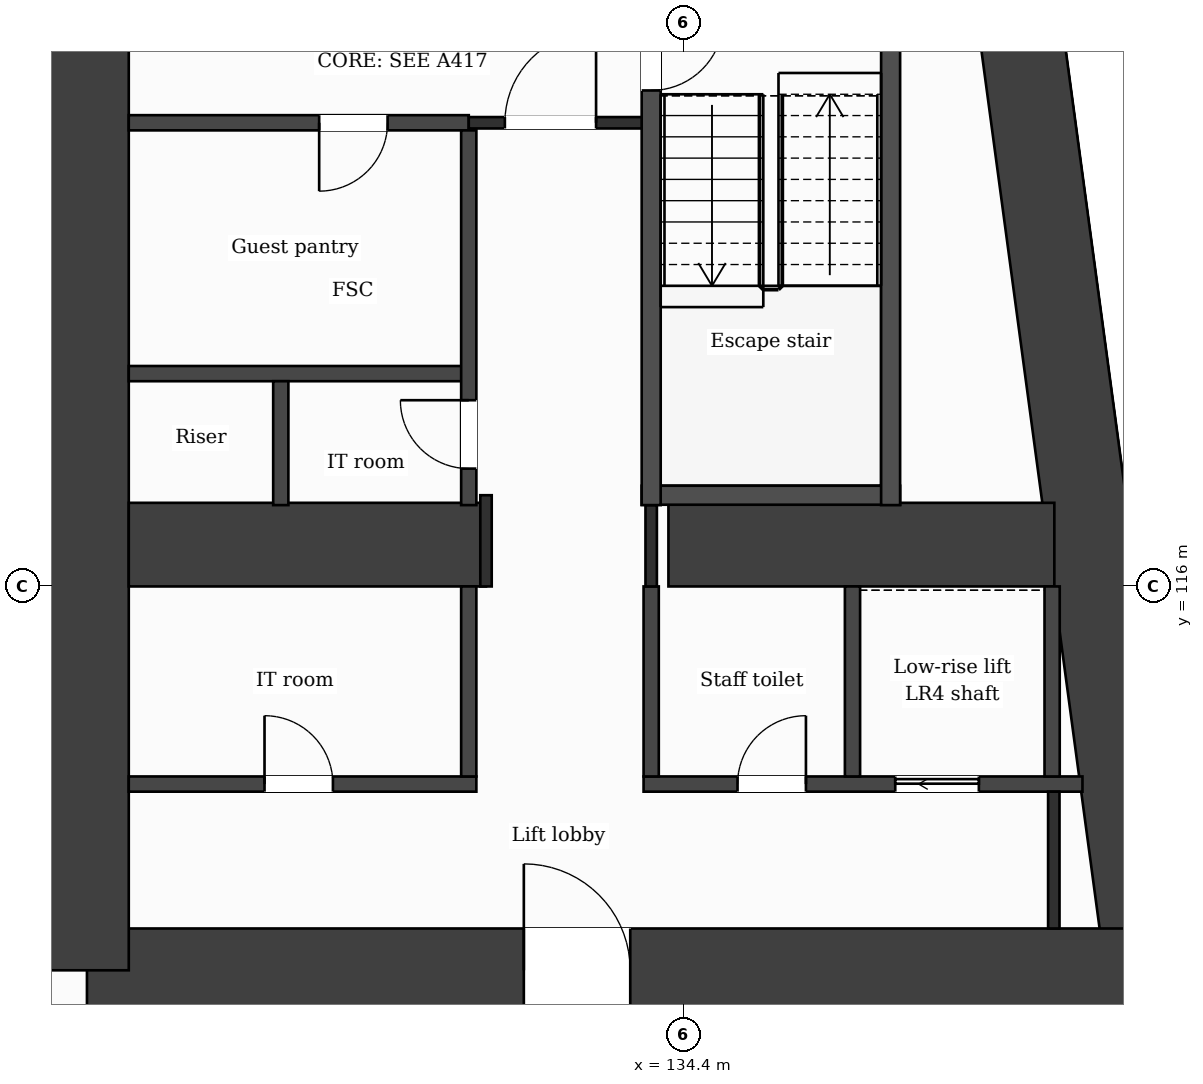
"""IFC4 building model, lengths in metres.
Left out: names, types, materials, properties, quantities, classifications, styles, units other than length and angle.
Written with IfcOpenShell. Run it as: python <this file> out.ifc"""

import sys

from ifc_helpers import new_model, si_unit, direction, frame, frame_2d, origin, place, context, subcontext, project, spatial, rectangle, extrude, element, fill, save


model = new_model("IFC4")
c1 = context("Model", 3, precision=1e-05, world=origin(), true_north=direction((0.0, 1.0)))
c2 = subcontext(c1, "Body", "Model", "MODEL_VIEW")
j1 = project(units=[si_unit("LENGTHUNIT", "METRE"), si_unit("PLANEANGLEUNIT", "RADIAN")], contexts=[c1])
p1 = place(None, origin())
s1 = spatial("IfcSite", under=j1, at=p1, CompositionType="ELEMENT")
p2 = place(p1, origin())
s2 = spatial("IfcBuilding", under=s1, at=p2, CompositionType="ELEMENT")
p3 = place(p2, frame((0.0, 0.0, 74.0)))
s3 = spatial("IfcBuildingStorey", under=s2, at=p3, CompositionType="ELEMENT", Elevation=74.0)
p4 = place(p3, frame((137.688, 131.85, 0.0), z_axis=(0.0, 0.0, 1.0), x_axis=(0.133411793472, -0.991060691059, 0.0)))
e1 = element("IfcWall", 1, at=p4, inside=s3, PredefinedType="SHEAR", context=c2, shape_type="SweptSolid", body=[
    extrude(rectangle(XDim=21.089, YDim=1.1, at=frame_2d((10.544, 0.0))), origin(), (0.0, 0.0, 1.0), 3.5),
])
p5 = place(p3, frame((140.502, 110.95, 0.0), z_axis=(0.0, 0.0, 1.0), x_axis=(-1.0, 0.0, 0.0)))
e2 = element("IfcWall", 2, at=p5, inside=s3, PredefinedType="SHEAR", context=c2, shape_type="SweptSolid", body=[
    extrude(rectangle(XDim=13.952, YDim=1.1, at=frame_2d((6.976, 0.0))), origin(), (0.0, 0.0, 1.0), 3.5),
])
p6 = place(p5, frame((6.804, 0.0, 0.0)))
e3 = element("IfcOpeningElement", 3, at=p6, cuts=e2, PredefinedType="OPENING", context=c2, shape_type="SweptSolid", body=[
    extrude(rectangle(XDim=1.4, YDim=2.1, at=frame_2d((0.7, 1.05))), frame((0.0, 0.56, 0.0), z_axis=(0.0, -1.0, 0.0), x_axis=(1.0, 0.0, 0.0)), (0.0, 0.0, 1.0), 1.12),
])
p7 = place(p3, frame((126.55, 110.95, 0.0), z_axis=(0.0, 0.0, 1.0), x_axis=(0.0, 1.0, 0.0)))
e4 = element("IfcWall", 4, at=p7, inside=s3, PredefinedType="SHEAR", context=c2, shape_type="SweptSolid", body=[
    extrude(rectangle(XDim=20.9, YDim=1.1, at=frame_2d((10.45, 0.0))), origin(), (0.0, 0.0, 1.0), 3.5),
])
p8 = place(p3, frame((127.1, 116.55, 0.0), z_axis=(0.0, 0.0, 1.0), x_axis=(1.0, 0.0, 0.0)))
e5 = element("IfcWall", 5, at=p8, inside=s3, PredefinedType="SHEAR", context=c2, shape_type="SweptSolid", body=[
    extrude(rectangle(XDim=4.7, YDim=1.1, at=frame_2d((2.35, 0.0))), origin(), (0.0, 0.0, 1.0), 3.5),
])
p9 = place(p3, frame((134.2, 116.55, 0.0), z_axis=(0.0, 0.0, 1.0), x_axis=(1.0, 0.0, 0.0)))
e6 = element("IfcWall", 6, at=p9, inside=s3, PredefinedType="SHEAR", context=c2, shape_type="SweptSolid", body=[
    extrude(rectangle(XDim=5.077, YDim=1.1, at=frame_2d((2.539, 0.0))), origin(), (0.0, 0.0, 1.0), 3.5),
])
p10 = place(p3, frame((127.1, 113.4, 0.0), z_axis=(0.0, 0.0, 1.0), x_axis=(1.0, 0.0, 0.0)))
e7 = element("IfcWall", 7, at=p10, inside=s3, PredefinedType="PARTITIONING", context=c2, shape_type="SweptSolid", body=[
    extrude(rectangle(XDim=4.573, YDim=0.2, at=frame_2d((2.287, 0.0))), origin(), (0.0, 0.0, 1.0), 3.18),
])
p11 = place(p10, frame((1.786, 0.0, 0.0)))
e8 = element("IfcOpeningElement", 8, at=p11, cuts=e7, PredefinedType="OPENING", context=c2, shape_type="SweptSolid", body=[
    extrude(rectangle(XDim=0.9, YDim=2.1, at=frame_2d((0.45, 1.05))), frame((0.0, 0.11, 0.0), z_axis=(0.0, -1.0, 0.0), x_axis=(1.0, 0.0, 0.0)), (0.0, 0.0, 1.0), 0.22),
])
p12 = place(p3, frame((133.873, 113.4, 0.0), z_axis=(0.0, 0.0, 1.0), x_axis=(1.0, 0.0, 0.0)))
e9 = element("IfcWall", 9, at=p12, inside=s3, PredefinedType="PARTITIONING", context=c2, shape_type="SweptSolid", body=[
    extrude(rectangle(XDim=5.774, YDim=0.2, at=frame_2d((2.887, 0.0))), origin(), (0.0, 0.0, 1.0), 3.18),
])
p13 = place(p12, frame((3.311, 0.0, 0.0)))
e10 = element("IfcOpeningElement", 10, at=p13, cuts=e9, PredefinedType="OPENING", context=c2, shape_type="SweptSolid", body=[
    extrude(rectangle(XDim=1.1, YDim=2.1, at=frame_2d((0.55, 1.05))), frame((0.0, 0.11, 0.0), z_axis=(0.0, -1.0, 0.0), x_axis=(1.0, 0.0, 0.0)), (0.0, 0.0, 1.0), 0.22),
])
p14 = place(p12, frame((1.236, 0.0, 0.0)))
e11 = element("IfcOpeningElement", 11, at=p14, cuts=e9, PredefinedType="OPENING", context=c2, shape_type="SweptSolid", body=[
    extrude(rectangle(XDim=0.9, YDim=2.1, at=frame_2d((0.45, 1.05))), frame((0.0, 0.11, 0.0), z_axis=(0.0, -1.0, 0.0), x_axis=(1.0, 0.0, 0.0)), (0.0, 0.0, 1.0), 0.22),
])
p15 = place(p3, frame((133.848, 117.2, 0.0), z_axis=(0.0, 0.0, 1.0), x_axis=(1.0, 0.0, 0.0)))
e12 = element("IfcWall", 12, at=p15, inside=s3, PredefinedType="PARTITIONING", context=c2, shape_type="SweptSolid", body=[
    extrude(rectangle(XDim=3.4, YDim=0.25, at=frame_2d((1.7, 0.0))), origin(), (0.0, 0.0, 1.0), 3.18),
])
p16 = place(p3, frame((127.1, 118.8, 0.0), z_axis=(0.0, 0.0, 1.0), x_axis=(1.0, 0.0, 0.0)))
e13 = element("IfcWall", 13, at=p16, inside=s3, PredefinedType="PARTITIONING", context=c2, shape_type="SweptSolid", body=[
    extrude(rectangle(XDim=4.473, YDim=0.2, at=frame_2d((2.236, 0.0))), origin(), (0.0, 0.0, 1.0), 3.18),
])
p17 = place(p3, frame((127.1, 122.1, 0.0), z_axis=(0.0, 0.0, 1.0), x_axis=(1.0, 0.0, 0.0)))
e14 = element("IfcWall", 14, at=p17, inside=s3, PredefinedType="PARTITIONING", context=c2, shape_type="SweptSolid", body=[
    extrude(rectangle(XDim=4.473, YDim=0.2, at=frame_2d((2.236, 0.0))), origin(), (0.0, 0.0, 1.0), 3.18),
])
p18 = place(p17, frame((2.505, 0.0, 0.0)))
e15 = element("IfcOpeningElement", 15, at=p18, cuts=e14, PredefinedType="OPENING", context=c2, shape_type="SweptSolid", body=[
    extrude(rectangle(XDim=0.9, YDim=2.1, at=frame_2d((0.45, 1.05))), frame((0.0, 0.11, 0.0), z_axis=(0.0, -1.0, 0.0), x_axis=(1.0, 0.0, 0.0)), (0.0, 0.0, 1.0), 0.22),
])
p19 = place(p3, frame((131.573, 122.1, 0.0), z_axis=(0.0, 0.0, 1.0), x_axis=(1.0, 0.0, 0.0)))
e16 = element("IfcWall", 16, at=p19, inside=s3, PredefinedType="PARTITIONING", context=c2, shape_type="SweptSolid", body=[
    extrude(rectangle(XDim=2.4, YDim=0.15, at=frame_2d((1.2, 0.0))), origin(), (0.0, 0.0, 1.0), 3.18),
])
p20 = place(p19, frame((0.475, 0.0, 0.0)))
e17 = element("IfcOpeningElement", 17, at=p20, cuts=e16, PredefinedType="OPENING", context=c2, shape_type="SweptSolid", body=[
    extrude(rectangle(XDim=1.2, YDim=2.1, at=frame_2d((0.6, 1.05))), frame((0.0, 0.085, 0.0), z_axis=(0.0, -1.0, 0.0), x_axis=(1.0, 0.0, 0.0)), (0.0, 0.0, 1.0), 0.17),
])
p21 = place(p3, frame((129.1, 117.07, 0.0), z_axis=(0.0, 0.0, 1.0), x_axis=(0.0, 1.0, 0.0)))
e18 = element("IfcWall", 18, at=p21, inside=s3, PredefinedType="PARTITIONING", context=c2, shape_type="SweptSolid", body=[
    extrude(rectangle(XDim=1.63, YDim=0.2, at=frame_2d((0.815, 0.0))), origin(), (0.0, 0.0, 1.0), 3.18),
])
p22 = place(p3, frame((131.573, 113.5, 0.0), z_axis=(0.0, 0.0, 1.0), x_axis=(0.0, 1.0, 0.0)))
e19 = element("IfcWall", 19, at=p22, inside=s3, PredefinedType="PARTITIONING", context=c2, shape_type="SweptSolid", body=[
    extrude(rectangle(XDim=2.5, YDim=0.2, at=frame_2d((1.25, 0.0))), origin(), (0.0, 0.0, 1.0), 3.18),
])
p23 = place(p3, frame((131.573, 117.07, 0.0), z_axis=(0.0, 0.0, 1.0), x_axis=(0.0, 1.0, 0.0)))
e20 = element("IfcWall", 20, at=p23, inside=s3, PredefinedType="PARTITIONING", context=c2, shape_type="SweptSolid", body=[
    extrude(rectangle(XDim=4.93, YDim=0.2, at=frame_2d((2.465, 0.0))), origin(), (0.0, 0.0, 1.0), 3.18),
])
p24 = place(p23, frame((0.48, 0.0, 0.0)))
e21 = element("IfcOpeningElement", 21, at=p24, cuts=e20, PredefinedType="OPENING", context=c2, shape_type="SweptSolid", body=[
    extrude(rectangle(XDim=0.9, YDim=2.1, at=frame_2d((0.45, 1.05))), frame((0.0, 0.11, 0.0), z_axis=(0.0, -1.0, 0.0), x_axis=(1.0, 0.0, 0.0)), (0.0, 0.0, 1.0), 0.22),
])
p25 = place(p3, frame((131.8, 116.0, 0.0), z_axis=(0.0, 0.0, 1.0), x_axis=(0.0, 1.0, 0.0)))
e22 = element("IfcWall", 22, at=p25, inside=s3, PredefinedType="PARTITIONING", context=c2, shape_type="SweptSolid", body=[
    extrude(rectangle(XDim=1.2, YDim=0.15, at=frame_2d((0.6, 0.0))), origin(), (0.0, 0.0, 1.0), 3.18),
])
p26 = place(p3, frame((133.973, 113.5, 0.0), z_axis=(0.0, 0.0, 1.0), x_axis=(0.0, 1.0, 0.0)))
e23 = element("IfcWall", 23, at=p26, inside=s3, PredefinedType="PARTITIONING", context=c2, shape_type="SweptSolid", body=[
    extrude(rectangle(XDim=2.5, YDim=0.2, at=frame_2d((1.25, 0.0))), origin(), (0.0, 0.0, 1.0), 3.18),
])
p27 = place(p3, frame((133.973, 116.0, 0.0), z_axis=(0.0, 0.0, 1.0), x_axis=(0.0, 1.0, 0.0)))
e24 = element("IfcWall", 24, at=p27, inside=s3, PredefinedType="PARTITIONING", context=c2, shape_type="SweptSolid", body=[
    extrude(rectangle(XDim=1.07, YDim=0.15, at=frame_2d((0.535, 0.0))), origin(), (0.0, 0.0, 1.0), 3.18),
])
p28 = place(p3, frame((133.973, 117.07, 0.0), z_axis=(0.0, 0.0, 1.0), x_axis=(0.0, 1.0, 0.0)))
e25 = element("IfcWall", 25, at=p28, inside=s3, PredefinedType="PARTITIONING", context=c2, shape_type="SweptSolid", body=[
    extrude(rectangle(XDim=6.755, YDim=0.25, at=frame_2d((3.377, 0.0))), origin(), (0.0, 0.0, 1.0), 3.18),
])
p29 = place(p28, frame((5.455, 0.0, 0.0)))
e26 = element("IfcOpeningElement", 26, at=p29, cuts=e25, PredefinedType="OPENING", context=c2, shape_type="SweptSolid", body=[
    extrude(rectangle(XDim=0.95, YDim=2.1, at=frame_2d((0.475, 1.05))), frame((0.0, 0.135, 0.0), z_axis=(0.0, -1.0, 0.0), x_axis=(1.0, 0.0, 0.0)), (0.0, 0.0, 1.0), 0.27),
])
p30 = place(p3, frame((136.622, 113.5, 0.0), z_axis=(0.0, 0.0, 1.0), x_axis=(0.0, 1.0, 0.0)))
e27 = element("IfcWall", 27, at=p30, inside=s3, PredefinedType="PARTITIONING", context=c2, shape_type="SweptSolid", body=[
    extrude(rectangle(XDim=2.5, YDim=0.2, at=frame_2d((1.25, 0.0))), origin(), (0.0, 0.0, 1.0), 3.18),
])
p31 = place(p3, frame((137.123, 117.07, 0.0), z_axis=(0.0, 0.0, 1.0), x_axis=(0.0, 1.0, 0.0)))
e28 = element("IfcWall", 28, at=p31, inside=s3, PredefinedType="PARTITIONING", context=c2, shape_type="SweptSolid", body=[
    extrude(rectangle(XDim=6.755, YDim=0.25, at=frame_2d((3.377, 0.0))), origin(), (0.0, 0.0, 1.0), 3.18),
])
p32 = place(p3, frame((139.248, 113.5, 0.0), z_axis=(0.0, 0.0, 1.0), x_axis=(0.0, 1.0, 0.0)))
e29 = element("IfcWall", 29, at=p32, inside=s3, PredefinedType="PARTITIONING", context=c2, shape_type="SweptSolid", body=[
    extrude(rectangle(XDim=2.5, YDim=0.2, at=frame_2d((1.25, 0.0))), origin(), (0.0, 0.0, 1.0), 3.18),
])
p33 = place(p3, frame((139.27, 111.5, 0.0), z_axis=(0.0, 0.0, 1.0), x_axis=(0.0, 1.0, 0.0)))
e30 = element("IfcWall", 30, at=p33, inside=s3, PredefinedType="PARTITIONING", context=c2, shape_type="SweptSolid", body=[
    extrude(rectangle(XDim=1.8, YDim=0.15, at=frame_2d((0.9, 0.0))), origin(), (0.0, 0.0, 1.0), 3.18),
])
p34 = place(p20, origin())
e31 = element("IfcDoor", 31, at=p34, inside=s3, OperationType="SINGLE_SWING_RIGHT", PredefinedType="DOOR", context=c2, shape_type="SweptSolid", body=[
    extrude(rectangle(XDim=1.2, YDim=2.1, at=frame_2d((0.6, 1.05))), frame((0.0, 0.025, 0.0), z_axis=(0.0, -1.0, 0.0), x_axis=(1.0, 0.0, 0.0)), (0.0, 0.0, 1.0), 0.05),
])
fill(e17, e31)
p35 = place(p18, origin())
e32 = element("IfcDoor", 32, at=p35, inside=s3, OperationType="SINGLE_SWING_LEFT", PredefinedType="DOOR", context=c2, shape_type="SweptSolid", body=[
    extrude(rectangle(XDim=0.9, YDim=2.1, at=frame_2d((0.45, 1.05))), frame((0.0, 0.025, 0.0), z_axis=(0.0, -1.0, 0.0), x_axis=(1.0, 0.0, 0.0)), (0.0, 0.0, 1.0), 0.05),
])
fill(e15, e32)
p36 = place(p29, origin())
e33 = element("IfcDoor", 33, at=p36, inside=s3, OperationType="SINGLE_SWING_RIGHT", PredefinedType="DOOR", context=c2, shape_type="SweptSolid", body=[
    extrude(rectangle(XDim=0.95, YDim=2.1, at=frame_2d((0.475, 1.05))), frame((0.0, 0.025, 0.0), z_axis=(0.0, -1.0, 0.0), x_axis=(1.0, 0.0, 0.0)), (0.0, 0.0, 1.0), 0.05),
])
fill(e26, e33)
p37 = place(p24, origin())
e34 = element("IfcDoor", 34, at=p37, inside=s3, OperationType="SINGLE_SWING_RIGHT", PredefinedType="DOOR", context=c2, shape_type="SweptSolid", body=[
    extrude(rectangle(XDim=0.9, YDim=2.1, at=frame_2d((0.45, 1.05))), frame((0.0, 0.025, 0.0), z_axis=(0.0, -1.0, 0.0), x_axis=(1.0, 0.0, 0.0)), (0.0, 0.0, 1.0), 0.05),
])
fill(e21, e34)
p38 = place(p13, origin())
e35 = element("IfcDoor", 35, at=p38, inside=s3, OperationType="SLIDING_TO_LEFT", PredefinedType="DOOR", context=c2, shape_type="SweptSolid", body=[
    extrude(rectangle(XDim=1.1, YDim=2.1, at=frame_2d((0.55, 1.05))), frame((0.0, 0.025, 0.0), z_axis=(0.0, -1.0, 0.0), x_axis=(1.0, 0.0, 0.0)), (0.0, 0.0, 1.0), 0.05),
])
fill(e10, e35)
p39 = place(p14, origin())
e36 = element("IfcDoor", 36, at=p39, inside=s3, OperationType="SINGLE_SWING_RIGHT", PredefinedType="DOOR", context=c2, shape_type="SweptSolid", body=[
    extrude(rectangle(XDim=0.9, YDim=2.1, at=frame_2d((0.45, 1.05))), frame((0.0, 0.025, 0.0), z_axis=(0.0, -1.0, 0.0), x_axis=(1.0, 0.0, 0.0)), (0.0, 0.0, 1.0), 0.05),
])
fill(e11, e36)
p40 = place(p11, origin())
e37 = element("IfcDoor", 37, at=p40, inside=s3, OperationType="SINGLE_SWING_LEFT", PredefinedType="DOOR", context=c2, shape_type="SweptSolid", body=[
    extrude(rectangle(XDim=0.9, YDim=2.1, at=frame_2d((0.45, 1.05))), frame((0.0, 0.025, 0.0), z_axis=(0.0, -1.0, 0.0), x_axis=(1.0, 0.0, 0.0)), (0.0, 0.0, 1.0), 0.05),
])
fill(e8, e37)
p41 = place(p6, origin())
e38 = element("IfcDoor", 38, at=p41, inside=s3, OperationType="SINGLE_SWING_RIGHT", PredefinedType="DOOR", context=c2, shape_type="SweptSolid", body=[
    extrude(rectangle(XDim=1.4, YDim=2.1, at=frame_2d((0.7, 1.05))), frame((0.0, 0.025, 0.0), z_axis=(0.0, -1.0, 0.0), x_axis=(1.0, 0.0, 0.0)), (0.0, 0.0, 1.0), 0.05),
])
fill(e3, e38)
save(model, sys.argv[1])
